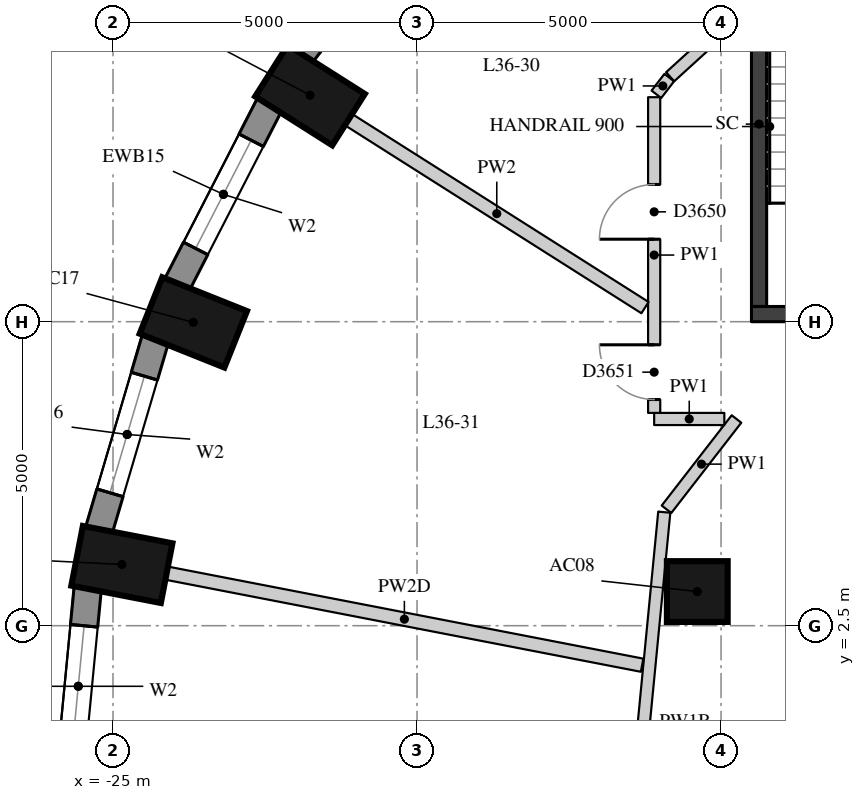
"""IFC4 building model, lengths in metres.
Left out: names, types, materials, properties, quantities, classifications, styles, units other than length and angle.
Written with IfcOpenShell. Run it as: python <this file> out.ifc"""

import sys

from ifc_helpers import new_model, si_unit, direction, frame, frame_2d, origin, origin_2d, place, context, subcontext, project, spatial, rectangle, extrude, element, fill, save


model = new_model("IFC4")
c1 = context("Model", 3, precision=1e-05, world=origin(), true_north=direction((0.0, 1.0)))
c2 = subcontext(c1, "Body", "Model", "MODEL_VIEW")
j1 = project(units=[si_unit("LENGTHUNIT", "METRE"), si_unit("PLANEANGLEUNIT", "RADIAN")], contexts=[c1])
p1 = place(None, origin())
s1 = spatial("IfcSite", under=j1, at=p1, CompositionType="ELEMENT")
p2 = place(p1, origin())
s2 = spatial("IfcBuilding", under=s1, at=p2, CompositionType="ELEMENT")
p3 = place(p2, frame((0.0, 0.0, 128.5)))
s3 = spatial("IfcBuildingStorey", under=s2, at=p3, CompositionType="ELEMENT", Elevation=128.5)
for number, where, z_axis, x_axis in (
    (1, (-21.76, 11.225, 0.0), (0.0, 0.0, 1.0), (-0.845, 0.536, 0.0)),
    (2, (-23.679, 7.489, 0.0), (0.0, 0.0, 1.0), (-0.929, 0.371, 0.0)),
    (3, (-24.854, 3.507, 0.0), (0.0, 0.0, 1.0), (-0.982, 0.19, 0.0)),
):
    element("IfcColumn", number, at=place(p3, frame(where, z_axis=z_axis, x_axis=x_axis)), inside=s3, PredefinedType="COLUMN", context=c2, shape_type="SweptSolid", body=[
        extrude(rectangle(XDim=1.5, YDim=1.0, at=origin_2d()), origin(), (0.0, 0.0, 1.0), 3.3),
    ])
p4 = place(p3, frame((-15.391, 3.062, 0.0), z_axis=(0.0, 0.0, 1.0), x_axis=(1.0, 0.0, 0.0)))
e4 = element("IfcColumn", 4, at=p4, inside=s3, PredefinedType="COLUMN", context=c2, shape_type="SweptSolid", body=[
    extrude(rectangle(XDim=1.0, YDim=1.0, at=origin_2d()), origin(), (0.0, 0.0, 1.0), 3.3),
])
p5 = place(p3, frame((-19.835, 14.575, 0.0), z_axis=(0.0, 0.0, 1.0), x_axis=(-0.610693945156, -0.791866721961, 0.0)))
e5 = element("IfcWall", 5, at=p5, inside=s3, PredefinedType="SOLIDWALL", context=c2, shape_type="SweptSolid", body=[
    extrude(rectangle(XDim=3.395, YDim=0.45, at=frame_2d((1.697, 0.0))), origin(), (0.0, 0.0, 1.0), 3.02),
])
p6 = place(p5, frame((0.697, 0.0, 0.4)))
e6 = element("IfcOpeningElement", 6, at=p6, cuts=e5, PredefinedType="OPENING", context=c2, shape_type="SweptSolid", body=[
    extrude(rectangle(XDim=2.0, YDim=1.75, at=frame_2d((1.0, 0.875))), frame((0.0, 0.235, 0.0), z_axis=(0.0, -1.0, 0.0), x_axis=(1.0, 0.0, 0.0)), (0.0, 0.0, 1.0), 0.47),
])
p7 = place(p3, frame((-22.423, 11.077, 0.0), z_axis=(0.0, 0.0, 1.0), x_axis=(-0.456828186229, -0.889554949549, 0.0)))
e7 = element("IfcWall", 7, at=p7, inside=s3, PredefinedType="SOLIDWALL", context=c2, shape_type="SweptSolid", body=[
    extrude(rectangle(XDim=3.333, YDim=0.45, at=frame_2d((1.667, 0.0))), origin(), (0.0, 0.0, 1.0), 3.02),
])
p8 = place(p7, frame((0.666, 0.0, 0.4)))
e8 = element("IfcOpeningElement", 8, at=p8, cuts=e7, PredefinedType="OPENING", context=c2, shape_type="SweptSolid", body=[
    extrude(rectangle(XDim=2.0, YDim=1.75, at=frame_2d((1.0, 0.875))), frame((0.0, 0.235, 0.0), z_axis=(0.0, -1.0, 0.0), x_axis=(1.0, 0.0, 0.0)), (0.0, 0.0, 1.0), 0.47),
])
p9 = place(p3, frame((-24.302, 7.221, 0.0), z_axis=(0.0, 0.0, 1.0), x_axis=(-0.283071248438, -0.959098883488, 0.0)))
e9 = element("IfcWall", 9, at=p9, inside=s3, PredefinedType="SOLIDWALL", context=c2, shape_type="SweptSolid", body=[
    extrude(rectangle(XDim=3.286, YDim=0.45, at=frame_2d((1.643, 0.0))), origin(), (0.0, 0.0, 1.0), 3.02),
])
p10 = place(p9, frame((0.643, 0.0, 0.4)))
e10 = element("IfcOpeningElement", 10, at=p10, cuts=e9, PredefinedType="OPENING", context=c2, shape_type="SweptSolid", body=[
    extrude(rectangle(XDim=2.0, YDim=1.75, at=frame_2d((1.0, 0.875))), frame((0.0, 0.235, 0.0), z_axis=(0.0, -1.0, 0.0), x_axis=(1.0, 0.0, 0.0)), (0.0, 0.0, 1.0), 0.47),
])
p11 = place(p3, frame((-25.415, 3.126, 0.0), z_axis=(0.0, 0.0, 1.0), x_axis=(-0.095967726544, -0.995384446062, 0.0)))
e11 = element("IfcWall", 11, at=p11, inside=s3, PredefinedType="SOLIDWALL", context=c2, shape_type="SweptSolid", body=[
    extrude(rectangle(XDim=3.261, YDim=0.45, at=frame_2d((1.631, 0.0))), origin(), (0.0, 0.0, 1.0), 3.02),
])
p12 = place(p11, frame((0.631, 0.0, 0.4)))
e12 = element("IfcOpeningElement", 12, at=p12, cuts=e11, PredefinedType="OPENING", context=c2, shape_type="SweptSolid", body=[
    extrude(rectangle(XDim=2.0, YDim=1.75, at=frame_2d((1.0, 0.875))), frame((0.0, 0.235, 0.0), z_axis=(0.0, -1.0, 0.0), x_axis=(1.0, 0.0, 0.0)), (0.0, 0.0, 1.0), 0.47),
])
p13 = place(p3, frame((-14.375, 7.75, -0.28), z_axis=(0.0, 0.0, 1.0), x_axis=(0.0, 1.0, 0.0)))
e13 = element("IfcWall", 13, at=p13, inside=s3, PredefinedType="SHEAR", context=c2, shape_type="SweptSolid", body=[
    extrude(rectangle(XDim=6.0, YDim=0.25, at=frame_2d((3.0, 0.0))), origin(), (0.0, 0.0, 1.0), 3.3),
])
p14 = place(p3, frame((-14.5, 7.625, -0.28), z_axis=(0.0, 0.0, 1.0), x_axis=(1.0, 0.0, 0.0)))
e14 = element("IfcWall", 14, at=p14, inside=s3, PredefinedType="SHEAR", context=c2, shape_type="SweptSolid", body=[
    extrude(rectangle(XDim=5.2, YDim=0.25, at=frame_2d((2.6, 0.0))), origin(), (0.0, 0.0, 1.0), 3.3),
])
p15 = place(p3, frame((-16.653, -3.047, 0.0), z_axis=(0.0, 0.0, 1.0), x_axis=(0.096559879606, 0.995327177189, 0.0)))
e15 = element("IfcWall", 15, at=p15, inside=s3, PredefinedType="PARTITIONING", context=c2, shape_type="SweptSolid", body=[
    extrude(rectangle(XDim=7.449, YDim=0.2, at=frame_2d((3.724, 0.0))), origin(), (0.0, 0.0, 1.0), 2.52),
])
p16 = place(p15, frame((0.864, 0.0, 0.0)))
e16 = element("IfcOpeningElement", 16, at=p16, cuts=e15, PredefinedType="OPENING", context=c2, shape_type="SweptSolid", body=[
    extrude(rectangle(XDim=1.1, YDim=2.1, at=frame_2d((0.55, 1.05))), frame((0.0, 0.11, 0.0), z_axis=(0.0, -1.0, 0.0), x_axis=(1.0, 0.0, 0.0)), (0.0, 0.0, 1.0), 0.22),
])
p17 = place(p3, frame((-15.897, 4.415, 0.0), z_axis=(0.0, 0.0, 1.0), x_axis=(0.612626457361, 0.790372585393, 0.0)))
e17 = element("IfcWall", 17, at=p17, inside=s3, PredefinedType="PARTITIONING", context=c2, shape_type="SweptSolid", body=[
    extrude(rectangle(XDim=1.879, YDim=0.2, at=frame_2d((0.939, 0.0))), origin(), (0.0, 0.0, 1.0), 3.02),
])
p18 = place(p3, frame((-14.946, 5.9, 0.0), z_axis=(0.0, 0.0, 1.0), x_axis=(-1.0, 0.0, 0.0)))
e18 = element("IfcWall", 18, at=p18, inside=s3, PredefinedType="PARTITIONING", context=c2, shape_type="SweptSolid", body=[
    extrude(rectangle(XDim=1.154, YDim=0.2, at=frame_2d((0.577, 0.0))), origin(), (0.0, 0.0, 1.0), 3.02),
])
p19 = place(p3, frame((-16.1, 6.0, 0.0), z_axis=(0.0, 0.0, 1.0), x_axis=(0.0, 1.0, 0.0)))
e19 = element("IfcWall", 19, at=p19, inside=s3, PredefinedType="PARTITIONING", context=c2, shape_type="SweptSolid", body=[
    extrude(rectangle(XDim=5.192, YDim=0.2, at=frame_2d((2.596, 0.0))), origin(), (0.0, 0.0, 1.0), 3.02),
])
p20 = place(p19, frame((2.857, 0.0, 0.0)))
e20 = element("IfcOpeningElement", 20, at=p20, cuts=e19, PredefinedType="OPENING", context=c2, shape_type="SweptSolid", body=[
    extrude(rectangle(XDim=0.9, YDim=2.1, at=frame_2d((0.45, 1.05))), frame((0.0, 0.11, 0.0), z_axis=(0.0, -1.0, 0.0), x_axis=(1.0, 0.0, 0.0)), (0.0, 0.0, 1.0), 0.22),
])
p21 = place(p19, frame((0.22, 0.0, 0.0)))
e21 = element("IfcOpeningElement", 21, at=p21, cuts=e19, PredefinedType="OPENING", context=c2, shape_type="SweptSolid", body=[
    extrude(rectangle(XDim=0.9, YDim=2.1, at=frame_2d((0.45, 1.05))), frame((0.0, 0.11, 0.0), z_axis=(0.0, -1.0, 0.0), x_axis=(1.0, 0.0, 0.0)), (0.0, 0.0, 1.0), 0.22),
])
p22 = place(p3, frame((-16.063, 11.24, 0.0), z_axis=(0.0, 0.0, 1.0), x_axis=(0.609744747854, 0.792597844096, 0.0)))
e22 = element("IfcWall", 22, at=p22, inside=s3, PredefinedType="PARTITIONING", context=c2, shape_type="SweptSolid", body=[
    extrude(rectangle(XDim=0.347, YDim=0.2, at=frame_2d((0.174, 0.0))), origin(), (0.0, 0.0, 1.0), 3.02),
])
p23 = place(p3, frame((-15.837, 11.528, 0.0), z_axis=(0.0, 0.0, 1.0), x_axis=(0.739402681643, 0.673263450946, 0.0)))
e23 = element("IfcWall", 23, at=p23, inside=s3, PredefinedType="PARTITIONING", context=c2, shape_type="SweptSolid", body=[
    extrude(rectangle(XDim=1.728, YDim=0.2, at=frame_2d((0.864, 0.0))), origin(), (0.0, 0.0, 1.0), 3.02),
])
p24 = place(p3, frame((-21.126, 10.823, 0.0), z_axis=(0.0, 0.0, 1.0), x_axis=(0.844518840625, -0.535525842355, 0.0)))
e24 = element("IfcWall", 24, at=p24, inside=s3, PredefinedType="PARTITIONING", context=c2, shape_type="SweptSolid", body=[
    extrude(rectangle(XDim=5.773, YDim=0.22, at=frame_2d((2.887, 0.0))), origin(), (0.0, 0.0, 1.0), 3.02),
])
p25 = place(p3, frame((-24.118, 3.364, 0.0), z_axis=(0.0, 0.0, 1.0), x_axis=(0.981757892546, -0.190135321348, 0.0)))
e25 = element("IfcWall", 25, at=p25, inside=s3, PredefinedType="PARTITIONING", context=c2, shape_type="SweptSolid", body=[
    extrude(rectangle(XDim=7.965, YDim=0.22, at=frame_2d((3.982, 0.0))), origin(), (0.0, 0.0, 1.0), 2.47),
])
p26 = place(p8, origin())
e26 = element("IfcWindow", 26, at=p26, inside=s3, PartitioningType="SINGLE_PANEL", PredefinedType="WINDOW", context=c2, shape_type="SweptSolid", body=[
    extrude(rectangle(XDim=2.0, YDim=1.75, at=frame_2d((1.0, 0.875))), frame((0.0, 0.035, 0.0), z_axis=(0.0, -1.0, 0.0), x_axis=(1.0, 0.0, 0.0)), (0.0, 0.0, 1.0), 0.06),
])
fill(e8, e26)
p27 = place(p10, origin())
e27 = element("IfcWindow", 27, at=p27, inside=s3, PartitioningType="SINGLE_PANEL", PredefinedType="WINDOW", context=c2, shape_type="SweptSolid", body=[
    extrude(rectangle(XDim=2.0, YDim=1.75, at=frame_2d((1.0, 0.875))), frame((0.0, 0.035, 0.0), z_axis=(0.0, -1.0, 0.0), x_axis=(1.0, 0.0, 0.0)), (0.0, 0.0, 1.0), 0.06),
])
fill(e10, e27)
p28 = place(p12, origin())
e28 = element("IfcWindow", 28, at=p28, inside=s3, PartitioningType="SINGLE_PANEL", PredefinedType="WINDOW", context=c2, shape_type="SweptSolid", body=[
    extrude(rectangle(XDim=2.0, YDim=1.75, at=frame_2d((1.0, 0.875))), frame((0.0, 0.035, 0.0), z_axis=(0.0, -1.0, 0.0), x_axis=(1.0, 0.0, 0.0)), (0.0, 0.0, 1.0), 0.06),
])
fill(e12, e28)
p29 = place(p20, origin())
e29 = element("IfcDoor", 29, at=p29, inside=s3, OperationType="SINGLE_SWING_LEFT", PredefinedType="DOOR", context=c2, shape_type="SweptSolid", body=[
    extrude(rectangle(XDim=0.9, YDim=2.1, at=frame_2d((0.45, 1.05))), frame((0.0, 0.025, 0.0), z_axis=(0.0, -1.0, 0.0), x_axis=(1.0, 0.0, 0.0)), (0.0, 0.0, 1.0), 0.05),
])
fill(e20, e29)
p30 = place(p21, origin())
e30 = element("IfcDoor", 30, at=p30, inside=s3, OperationType="SINGLE_SWING_RIGHT", PredefinedType="DOOR", context=c2, shape_type="SweptSolid", body=[
    extrude(rectangle(XDim=0.9, YDim=2.1, at=frame_2d((0.45, 1.05))), frame((0.0, 0.025, 0.0), z_axis=(0.0, -1.0, 0.0), x_axis=(1.0, 0.0, 0.0)), (0.0, 0.0, 1.0), 0.05),
])
fill(e21, e30)
save(model, sys.argv[1])
